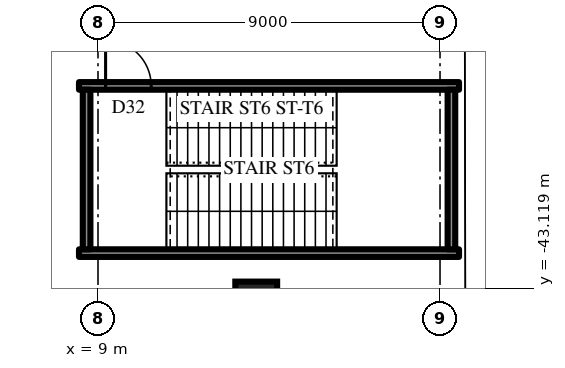
"""IFC4 building model, lengths in metres.
Left out: names, types, materials, properties, quantities, classifications, styles, units other than length and angle.
Written with IfcOpenShell. Run it as: python <this file> out.ifc"""

import sys

from ifc_helpers import new_model, si_unit, direction, frame, frame_2d, origin, origin_2d, place, context, subcontext, project, spatial, rectangle, extrude, element, fill, save


model = new_model("IFC4")
c1 = context("Model", 3, precision=1e-05, world=origin(), true_north=direction((0.0, 1.0)))
c2 = subcontext(c1, "Body", "Model", "MODEL_VIEW")
j1 = project(units=[si_unit("LENGTHUNIT", "METRE"), si_unit("PLANEANGLEUNIT", "RADIAN")], contexts=[c1])
p1 = place(None, origin())
s1 = spatial("IfcSite", under=j1, at=p1, CompositionType="ELEMENT")
p2 = place(p1, origin())
s2 = spatial("IfcBuilding", under=s1, at=p2, CompositionType="ELEMENT")
p3 = place(p2, frame((0.0, 0.0, 7.0)))
s3 = spatial("IfcBuildingStorey", under=s2, at=p3, CompositionType="ELEMENT", Elevation=7.0)
p4 = place(p3, frame((8.5, -42.2, 0.0), z_axis=(0.0, 0.0, 1.0), x_axis=(1.0, 0.0, 0.0)))
e1 = element("IfcWall", 1, at=p4, inside=s3, PredefinedType="SHEAR", context=c2, shape_type="SweptSolid", body=[
    extrude(rectangle(XDim=10.0, YDim=0.2, at=frame_2d((5.0, 0.0))), origin(), (0.0, 0.0, 1.0), 6.0),
])
p5 = place(p3, frame((18.5, -37.8, 0.0), z_axis=(0.0, 0.0, 1.0), x_axis=(-1.0, 0.0, 0.0)))
e2 = element("IfcWall", 2, at=p5, inside=s3, PredefinedType="SHEAR", context=c2, shape_type="SweptSolid", body=[
    extrude(rectangle(XDim=10.0, YDim=0.2, at=frame_2d((5.0, 0.0))), origin(), (0.0, 0.0, 1.0), 6.0),
])
p6 = place(p5, frame((8.1, 0.0, 0.0)))
e3 = element("IfcOpeningElement", 3, at=p6, cuts=e2, PredefinedType="OPENING", context=c2, shape_type="SweptSolid", body=[
    extrude(rectangle(XDim=1.2, YDim=2.2, at=frame_2d((0.6, 1.1))), frame((0.0, 0.11, 0.0), z_axis=(0.0, -1.0, 0.0), x_axis=(1.0, 0.0, 0.0)), (0.0, 0.0, 1.0), 0.22),
])
for number, where, z_axis, x_axis in (
    (4, (8.7, -37.9, 0.0), (0.0, 0.0, 1.0), (0.0, -1.0, 0.0)),
    (5, (18.3, -42.1, 0.0), (0.0, 0.0, 1.0), (0.0, 1.0, 0.0)),
):
    element("IfcWall", number, at=place(p3, frame(where, z_axis=z_axis, x_axis=x_axis)), inside=s3, PredefinedType="SHEAR", context=c2, shape_type="SweptSolid", body=[
        extrude(rectangle(XDim=4.2, YDim=0.2, at=frame_2d((2.1, 0.0))), origin(), (0.0, 0.0, 1.0), 6.0),
    ])
p7 = place(p3, frame((13.164, -43.5, 0.0), z_axis=(0.0, 0.0, 1.0), x_axis=(1.0, 0.0, 0.0)))
e6 = element("IfcColumn", 6, at=p7, inside=s3, PredefinedType="COLUMN", context=c2, shape_type="SweptSolid", body=[
    extrude(rectangle(XDim=1.1, YDim=1.1, at=origin_2d()), origin(), (0.0, 0.0, 1.0), 6.0),
])
p8 = place(p6, frame((1.2, 0.0, 0.0), z_axis=(0.0, 0.0, 1.0), x_axis=(-1.0, 0.0, 0.0)))
e7 = element("IfcDoor", 7, at=p8, inside=s3, OperationType="SINGLE_SWING_RIGHT", PredefinedType="DOOR", context=c2, shape_type="SweptSolid", body=[
    extrude(rectangle(XDim=1.2, YDim=2.2, at=frame_2d((0.6, 1.1))), frame((0.0, 0.025, 0.0), z_axis=(0.0, -1.0, 0.0), x_axis=(1.0, 0.0, 0.0)), (0.0, 0.0, 1.0), 0.05),
])
fill(e3, e7)
save(model, sys.argv[1])
